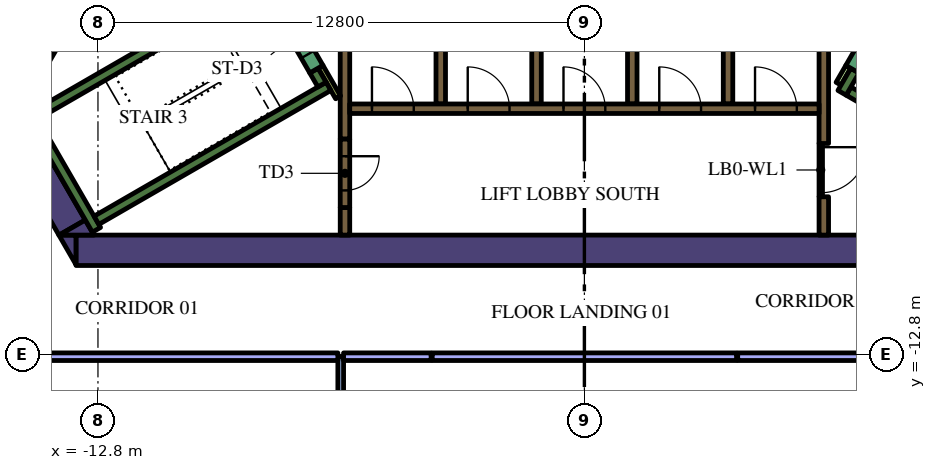
"""IFC4 building model, lengths in metres.
Left out: names, types, materials, properties, quantities, classifications, styles, units other than length and angle.
Written with IfcOpenShell. Run it as: python <this file> out.ifc"""

import sys

from ifc_helpers import new_model, si_unit, direction, frame, frame_2d, origin, place, context, subcontext, project, spatial, polyline, rectangle, outline, extrude, element, fill, save


model = new_model("IFC4")
c1 = context("Model", 3, precision=1e-05, world=origin(), true_north=direction((0.0, 1.0)))
c2 = subcontext(c1, "Body", "Model", "MODEL_VIEW")
j1 = project(units=[si_unit("LENGTHUNIT", "METRE"), si_unit("PLANEANGLEUNIT", "RADIAN")], contexts=[c1])
p1 = place(None, origin())
s1 = spatial("IfcSite", under=j1, at=p1, CompositionType="ELEMENT")
p2 = place(p1, origin())
s2 = spatial("IfcBuilding", under=s1, at=p2, CompositionType="ELEMENT")
p3 = place(p2, frame((0.0, 0.0, 171.0)))
s3 = spatial("IfcBuildingStorey", under=s2, at=p3, CompositionType="ELEMENT", Elevation=171.0)
p4 = place(p3, frame((-13.378, -10.05, 0.0), z_axis=(0.0, 0.0, 1.0), x_axis=(1.0, 0.0, 0.0)))
e1 = element("IfcWall", 1, at=p4, inside=s3, PredefinedType="SOLIDWALL", context=c2, shape_type="SweptSolid", body=[
    extrude(rectangle(XDim=22.282, YDim=0.8, at=frame_2d((11.141, 0.0))), origin(), (0.0, 0.0, 1.0), 4.2),
])
p5 = place(p3, origin())
e2 = element("IfcWall", 2, at=p5, inside=s3, PredefinedType="SOLIDWALL", context=c2, shape_type="SweptSolid", body=[
    extrude(outline(polyline([(-13.828, -9.65), (-13.38, -9.65), (-13.38, -10.426), (-13.828, -9.65)])), origin(), (0.0, 0.0, 1.0), 4.2),
])
p6 = place(p3, frame((-15.392, -6.14, 0.0), z_axis=(0.0, 0.0, 1.0), x_axis=(0.499984020225, -0.866034629516, 0.0)))
e3 = element("IfcWall", 3, at=p6, inside=s3, PredefinedType="SOLIDWALL", context=c2, shape_type="SweptSolid", body=[
    extrude(rectangle(XDim=3.824, YDim=0.8, at=frame_2d((1.912, 0.0))), origin(), (0.0, 0.0, 1.0), 4.2),
])
e4 = element("IfcWall", 4, at=p5, inside=s3, PredefinedType="SOLIDWALL", context=c2, shape_type="SweptSolid", body=[
    extrude(outline(polyline([(-12.904, -9.65), (-13.82, -9.65), (-13.133, -9.253), (-12.904, -9.65)])), origin(), (0.0, 0.0, 1.0), 4.2),
])
p7 = place(p3, frame((-13.518, -3.314, 0.0), z_axis=(0.0, 0.0, 1.0), x_axis=(-0.499969377405, -0.866043083026, 0.0)))
e5 = element("IfcWall", 5, at=p7, inside=s3, PredefinedType="SOLIDWALL", context=c2, shape_type="SweptSolid", body=[
    extrude(rectangle(XDim=2.824, YDim=0.8, at=frame_2d((1.412, 0.0))), origin(), (0.0, 0.0, 1.0), 4.2),
])
p8 = place(p3, frame((12.84, -9.261, 0.0), z_axis=(0.0, 0.0, 1.0), x_axis=(-0.866013990052, 0.500019768644, 0.0)))
e6 = element("IfcWall", 6, at=p8, inside=s3, PredefinedType="SOLIDWALL", context=c2, shape_type="SweptSolid", body=[
    extrude(rectangle(XDim=6.8, YDim=0.25, at=frame_2d((3.4, 0.0))), origin(), (0.0, 0.0, 1.0), 4.2),
])
p9 = place(p3, frame((6.78, -5.906, 0.0), z_axis=(0.0, 0.0, 1.0), x_axis=(0.500223362819, 0.865896406789, 0.0)))
e7 = element("IfcWall", 7, at=p9, inside=s3, PredefinedType="SOLIDWALL", context=c2, shape_type="SweptSolid", body=[
    extrude(rectangle(XDim=0.675, YDim=0.25, at=frame_2d((0.337, 0.0))), origin(), (0.0, 0.0, 1.0), 4.2),
])
p10 = place(p3, frame((-12.84, -9.511, 0.0), z_axis=(0.0, 0.0, 1.0), x_axis=(-0.499997733992, 0.866026712061, 0.0)))
e8 = element("IfcWall", 8, at=p10, inside=s3, PredefinedType="SOLIDWALL", context=c2, shape_type="SweptSolid", body=[
    extrude(rectangle(XDim=3.634, YDim=0.25, at=frame_2d((1.817, 0.0))), origin(), (0.0, 0.0, 1.0), 4.2),
])
p11 = place(p3, frame((-14.44, -6.49, 0.0), z_axis=(0.0, 0.0, 1.0), x_axis=(0.866022966069, 0.500004222222, 0.0)))
e9 = element("IfcWall", 9, at=p11, inside=s3, PredefinedType="SOLIDWALL", context=c2, shape_type="SweptSolid", body=[
    extrude(rectangle(XDim=6.8, YDim=0.25, at=frame_2d((3.4, 0.0))), origin(), (0.0, 0.0, 1.0), 4.2),
])
p12 = place(p3, frame((-12.84, -9.261, 0.0), z_axis=(0.0, 0.0, 1.0), x_axis=(0.866016039709, 0.500016218704, 0.0)))
e10 = element("IfcWall", 10, at=p12, inside=s3, PredefinedType="SOLIDWALL", context=c2, shape_type="SweptSolid", body=[
    extrude(rectangle(XDim=7.05, YDim=0.25, at=frame_2d((3.525, 0.0))), origin(), (0.0, 0.0, 1.0), 4.2),
])
p13 = place(p3, frame((-6.905, -5.69, 0.0), z_axis=(0.0, 0.0, 1.0), x_axis=(-0.500402024738, 0.865793170242, 0.0)))
e11 = element("IfcWall", 11, at=p13, inside=s3, PredefinedType="SOLIDWALL", context=c2, shape_type="SweptSolid", body=[
    extrude(rectangle(XDim=0.425, YDim=0.25, at=frame_2d((0.212, 0.0))), origin(), (0.0, 0.0, 1.0), 4.2),
])
p14 = place(p3, frame((-6.3, -8.925, 0.0), z_axis=(0.0, 0.0, 1.0), x_axis=(0.0, -1.0, 0.0)))
e12 = element("IfcWall", 12, at=p14, inside=s3, PredefinedType="SOLIDWALL", context=c2, shape_type="SweptSolid", body=[
    extrude(rectangle(XDim=0.725, YDim=0.25, at=frame_2d((0.363, 0.0))), origin(), (0.0, 0.0, 1.0), 4.2),
])
p15 = place(p3, frame((6.3, -7.24, 0.0), z_axis=(0.0, 0.0, 1.0), x_axis=(0.0, 1.0, 0.0)))
e13 = element("IfcWall", 13, at=p15, inside=s3, PredefinedType="SOLIDWALL", context=c2, shape_type="SweptSolid", body=[
    extrude(rectangle(XDim=3.24, YDim=0.25, at=frame_2d((1.62, 0.0))), origin(), (0.0, 0.0, 1.0), 4.2),
])
p16 = place(p3, frame((6.3, -9.65, 0.0), z_axis=(0.0, 0.0, 1.0), x_axis=(0.0, 1.0, 0.0)))
e14 = element("IfcWall", 14, at=p16, inside=s3, PredefinedType="SOLIDWALL", context=c2, shape_type="SweptSolid", body=[
    extrude(rectangle(XDim=1.008, YDim=0.25, at=frame_2d((0.504, 0.0))), origin(), (0.0, 0.0, 1.0), 4.2),
])
for number, where, z_axis, x_axis in (
    (15, (3.78, -4.0, 0.0), (0.0, 0.0, 1.0), (0.0, -1.0, 0.0)),
    (16, (1.26, -4.0, 0.0), (0.0, 0.0, 1.0), (0.0, -1.0, 0.0)),
    (17, (-1.26, -4.0, 0.0), (0.0, 0.0, 1.0), (0.0, -1.0, 0.0)),
    (18, (-3.78, -4.0, 0.0), (0.0, 0.0, 1.0), (0.0, -1.0, 0.0)),
):
    element("IfcWall", number, at=place(p3, frame(where, z_axis=z_axis, x_axis=x_axis)), inside=s3, PredefinedType="SOLIDWALL", context=c2, shape_type="SweptSolid", body=[
        extrude(rectangle(XDim=2.2, YDim=0.25, at=frame_2d((1.1, 0.0))), origin(), (0.0, 0.0, 1.0), 4.2),
    ])
p17 = place(p3, frame((-6.3, -7.125, 0.0), z_axis=(0.0, 0.0, 1.0), x_axis=(0.0, 1.0, 0.0)))
e19 = element("IfcWall", 19, at=p17, inside=s3, PredefinedType="SOLIDWALL", context=c2, shape_type="SweptSolid", body=[
    extrude(rectangle(XDim=3.125, YDim=0.25, at=frame_2d((1.562, 0.0))), origin(), (0.0, 0.0, 1.0), 4.2),
])
p18 = place(p3, frame((-6.48, -6.027, 0.0), z_axis=(0.0, 0.0, 1.0), x_axis=(-0.499927229454, 0.866067413802, 0.0)))
e20 = element("IfcWall", 20, at=p18, inside=s3, PredefinedType="PARTITIONING", context=c2, shape_type="SweptSolid", body=[
    extrude(rectangle(XDim=0.929, YDim=0.15, at=frame_2d((0.464, 0.0))), origin(), (0.0, 0.0, 1.0), 4.2),
])
p19 = place(p3, frame((6.945, -5.222, 0.0), z_axis=(0.0, 0.0, 1.0), x_axis=(-0.499818422106, -0.866130212453, 0.0)))
e21 = element("IfcWall", 21, at=p19, inside=s3, PredefinedType="PARTITIONING", context=c2, shape_type="SweptSolid", body=[
    extrude(rectangle(XDim=0.514, YDim=0.15, at=frame_2d((0.257, 0.0))), origin(), (0.0, 0.0, 1.0), 3.15),
])
p20 = place(p3, frame((-6.175, -6.325, 0.0), z_axis=(0.0, 0.0, 1.0), x_axis=(1.0, 0.0, 0.0)))
e22 = element("IfcWall", 22, at=p20, inside=s3, PredefinedType="SOLIDWALL", context=c2, shape_type="SweptSolid", body=[
    extrude(rectangle(XDim=12.35, YDim=0.25, at=frame_2d((6.175, 0.0))), origin(), (0.0, 0.0, 1.0), 4.2),
])
p21 = place(p20, frame((0.585, 0.0, 0.0)))
e23 = element("IfcOpeningElement", 23, at=p21, cuts=e22, PredefinedType="OPENING", context=c2, shape_type="SweptSolid", body=[
    extrude(rectangle(XDim=1.1, YDim=2.1, at=frame_2d((0.55, 1.05))), frame((0.0, 0.135, 0.0), z_axis=(0.0, -1.0, 0.0), x_axis=(1.0, 0.0, 0.0)), (0.0, 0.0, 1.0), 0.27),
])
p22 = place(p20, frame((3.105, 0.0, 0.0)))
e24 = element("IfcOpeningElement", 24, at=p22, cuts=e22, PredefinedType="OPENING", context=c2, shape_type="SweptSolid", body=[
    extrude(rectangle(XDim=1.1, YDim=2.1, at=frame_2d((0.55, 1.05))), frame((0.0, 0.135, 0.0), z_axis=(0.0, -1.0, 0.0), x_axis=(1.0, 0.0, 0.0)), (0.0, 0.0, 1.0), 0.27),
])
p23 = place(p20, frame((5.625, 0.0, 0.0)))
e25 = element("IfcOpeningElement", 25, at=p23, cuts=e22, PredefinedType="OPENING", context=c2, shape_type="SweptSolid", body=[
    extrude(rectangle(XDim=1.1, YDim=2.1, at=frame_2d((0.55, 1.05))), frame((0.0, 0.135, 0.0), z_axis=(0.0, -1.0, 0.0), x_axis=(1.0, 0.0, 0.0)), (0.0, 0.0, 1.0), 0.27),
])
p24 = place(p20, frame((8.145, 0.0, 0.0)))
e26 = element("IfcOpeningElement", 26, at=p24, cuts=e22, PredefinedType="OPENING", context=c2, shape_type="SweptSolid", body=[
    extrude(rectangle(XDim=1.1, YDim=2.1, at=frame_2d((0.55, 1.05))), frame((0.0, 0.135, 0.0), z_axis=(0.0, -1.0, 0.0), x_axis=(1.0, 0.0, 0.0)), (0.0, 0.0, 1.0), 0.27),
])
p25 = place(p20, frame((10.665, 0.0, 0.0)))
e27 = element("IfcOpeningElement", 27, at=p25, cuts=e22, PredefinedType="OPENING", context=c2, shape_type="SweptSolid", body=[
    extrude(rectangle(XDim=1.1, YDim=2.1, at=frame_2d((0.55, 1.05))), frame((0.0, 0.135, 0.0), z_axis=(0.0, -1.0, 0.0), x_axis=(1.0, 0.0, 0.0)), (0.0, 0.0, 1.0), 0.27),
])
p26 = place(p3, frame((7.053, -5.284, 0.0), z_axis=(0.0, 0.0, 1.0), x_axis=(0.500078061341, 0.865980330357, 0.0)))
e28 = element("IfcWall", 28, at=p26, inside=s3, PredefinedType="SOLIDWALL", context=c2, shape_type="SweptSolid", body=[
    extrude(rectangle(XDim=2.1, YDim=0.4, at=frame_2d((1.05, 0.0))), origin(), (0.0, 0.0, 1.0), 4.2),
])
p27 = place(p26, frame((0.45, 0.0, 0.0)))
e29 = element("IfcOpeningElement", 29, at=p27, cuts=e28, PredefinedType="OPENING", context=c2, shape_type="SweptSolid", body=[
    extrude(rectangle(XDim=1.2, YDim=2.1, at=frame_2d((0.6, 1.05))), frame((0.0, 0.21, 0.0), z_axis=(0.0, -1.0, 0.0), x_axis=(1.0, 0.0, 0.0)), (0.0, 0.0, 1.0), 0.42),
])
p28 = place(p3, frame((-8.103, -3.466, 0.0), z_axis=(0.0, 0.0, 1.0), x_axis=(0.500078061341, -0.865980330357, 0.0)))
e30 = element("IfcWall", 30, at=p28, inside=s3, PredefinedType="SOLIDWALL", context=c2, shape_type="SweptSolid", body=[
    extrude(rectangle(XDim=2.1, YDim=0.4, at=frame_2d((1.05, 0.0))), origin(), (0.0, 0.0, 1.0), 4.2),
])
p29 = place(p28, frame((0.45, 0.0, 0.0)))
e31 = element("IfcOpeningElement", 31, at=p29, cuts=e30, PredefinedType="OPENING", context=c2, shape_type="SweptSolid", body=[
    extrude(rectangle(XDim=1.2, YDim=2.1, at=frame_2d((0.6, 1.05))), frame((0.0, 0.21, 0.0), z_axis=(0.0, -1.0, 0.0), x_axis=(1.0, 0.0, 0.0)), (0.0, 0.0, 1.0), 0.42),
])
p30 = place(p3, frame((-6.3, -7.125, 0.0), z_axis=(0.0, 0.0, 1.0), x_axis=(0.0, -1.0, 0.0)))
e32 = element("IfcWall", 32, at=p30, inside=s3, PredefinedType="SOLIDWALL", context=c2, shape_type="SweptSolid", body=[
    extrude(rectangle(XDim=1.8, YDim=0.25, at=frame_2d((0.9, 0.0))), origin(), (0.0, 0.0, 1.0), 4.2),
])
p31 = place(p30, frame((0.45, 0.0, 0.0)))
e33 = element("IfcOpeningElement", 33, at=p31, cuts=e32, PredefinedType="OPENING", context=c2, shape_type="SweptSolid", body=[
    extrude(rectangle(XDim=0.9, YDim=2.1, at=frame_2d((0.45, 1.05))), frame((0.0, 0.135, 0.0), z_axis=(0.0, -1.0, 0.0), x_axis=(1.0, 0.0, 0.0)), (0.0, 0.0, 1.0), 0.27),
])
p32 = place(p3, frame((6.22, -7.237, 0.0), z_axis=(0.0, 0.0, 1.0), x_axis=(0.0, -1.0, 0.0)))
e34 = element("IfcWall", 34, at=p32, inside=s3, PredefinedType="PARTITIONING", context=c2, shape_type="SweptSolid", body=[
    extrude(rectangle(XDim=1.4, YDim=0.09, at=frame_2d((0.7, 0.0))), origin(), (0.0, 0.0, 1.0), 3.15),
])
p33 = place(p32, frame((0.1, 0.0, 0.0)))
e35 = element("IfcOpeningElement", 35, at=p33, cuts=e34, PredefinedType="OPENING", context=c2, shape_type="SweptSolid", body=[
    extrude(rectangle(XDim=1.2, YDim=2.1, at=frame_2d((0.6, 1.05))), frame((0.0, 0.055, 0.0), z_axis=(0.0, -1.0, 0.0), x_axis=(1.0, 0.0, 0.0)), (0.0, 0.0, 1.0), 0.11),
])
p34 = place(p3, frame((-6.412, -16.672, 0.0), z_axis=(0.0, 0.0, 1.0), x_axis=(0.0, 1.0, 0.0)))
e36 = element("IfcWall", 36, at=p34, inside=s3, PredefinedType="PARTITIONING", context=c2, shape_type="SweptSolid", body=[
    extrude(rectangle(XDim=3.822, YDim=0.15, at=frame_2d((1.911, 0.0))), origin(), (0.0, 0.0, 1.0), 3.15),
])
p35 = place(p34, frame((1.422, 0.0, 0.0)))
e37 = element("IfcOpeningElement", 37, at=p35, cuts=e36, PredefinedType="OPENING", context=c2, shape_type="SweptSolid", body=[
    extrude(rectangle(XDim=0.9, YDim=2.1, at=frame_2d((0.45, 1.05))), frame((0.0, 0.085, 0.0), z_axis=(0.0, -1.0, 0.0), x_axis=(1.0, 0.0, 0.0)), (0.0, 0.0, 1.0), 0.17),
])
p36 = place(p3, frame((-14.721, -12.85, 0.0), z_axis=(0.0, 0.0, 1.0), x_axis=(1.0, 0.0, 0.0)))
e38 = element("IfcWall", 38, at=p36, inside=s3, PredefinedType="PARTITIONING", context=c2, shape_type="SweptSolid", body=[
    extrude(rectangle(XDim=8.234, YDim=0.2, at=frame_2d((4.117, 0.0))), origin(), (0.0, 0.0, 1.0), 3.15),
])
p37 = place(p3, frame((-4.004, -12.85, 0.0), z_axis=(0.0, 0.0, 1.0), x_axis=(1.0, 0.0, 0.0)))
e39 = element("IfcWall", 39, at=p37, inside=s3, PredefinedType="PARTITIONING", context=c2, shape_type="SweptSolid", body=[
    extrude(rectangle(XDim=8.008, YDim=0.2, at=frame_2d((4.004, 0.0))), origin(), (0.0, 0.0, 1.0), 3.15),
])
p38 = place(p3, frame((-6.337, -12.85, 0.0), z_axis=(0.0, 0.0, 1.0), x_axis=(1.0, 0.0, 0.0)))
e40 = element("IfcWall", 40, at=p38, inside=s3, PredefinedType="PARTITIONING", context=c2, shape_type="SweptSolid", body=[
    extrude(rectangle(XDim=2.303, YDim=0.2, at=frame_2d((1.151, 0.0))), origin(), (0.0, 0.0, 1.0), 3.15),
])
p39 = place(p3, frame((4.034, -12.85, 0.0), z_axis=(0.0, 0.0, 1.0), x_axis=(1.0, 0.0, 0.0)))
e41 = element("IfcWall", 41, at=p39, inside=s3, PredefinedType="PARTITIONING", context=c2, shape_type="SweptSolid", body=[
    extrude(rectangle(XDim=10.717, YDim=0.2, at=frame_2d((5.359, 0.0))), origin(), (0.0, 0.0, 1.0), 3.15),
])
p40 = place(p39, frame((4.9, 0.0, 0.0)))
e42 = element("IfcOpeningElement", 42, at=p40, cuts=e41, PredefinedType="OPENING", context=c2, shape_type="SweptSolid", body=[
    extrude(rectangle(XDim=1.0, YDim=2.1, at=frame_2d((0.5, 1.05))), frame((0.0, 0.11, 0.0), z_axis=(0.0, -1.0, 0.0), x_axis=(1.0, 0.0, 0.0)), (0.0, 0.0, 1.0), 0.22),
])
p41 = place(p3, frame((-13.146, 2.931, 0.0), z_axis=(0.0, 0.0, 1.0), x_axis=(-0.499997861235, -0.866026638597, 0.0)))
e43 = element("IfcWall", 43, at=p41, inside=s3, PredefinedType="PARTITIONING", context=c2, shape_type="SweptSolid", body=[
    extrude(rectangle(XDim=10.717, YDim=0.2, at=frame_2d((5.359, 0.0))), origin(), (0.0, 0.0, 1.0), 3.15),
])
p42 = place(p41, frame((4.9, 0.0, 0.0)))
e44 = element("IfcOpeningElement", 44, at=p42, cuts=e43, PredefinedType="OPENING", context=c2, shape_type="SweptSolid", body=[
    extrude(rectangle(XDim=1.0, YDim=2.1, at=frame_2d((0.5, 1.05))), frame((0.0, 0.11, 0.0), z_axis=(0.0, -1.0, 0.0), x_axis=(1.0, 0.0, 0.0)), (0.0, 0.0, 1.0), 0.22),
])
p43 = place(p21, origin())
e45 = element("IfcDoor", 45, at=p43, inside=s3, OperationType="DOUBLE_DOOR_SLIDING", PredefinedType="DOOR", context=c2, shape_type="SweptSolid", body=[
    extrude(rectangle(XDim=1.1, YDim=2.1, at=frame_2d((0.55, 1.05))), frame((0.0, 0.025, 0.0), z_axis=(0.0, -1.0, 0.0), x_axis=(1.0, 0.0, 0.0)), (0.0, 0.0, 1.0), 0.05),
])
fill(e23, e45)
p44 = place(p22, origin())
e46 = element("IfcDoor", 46, at=p44, inside=s3, OperationType="DOUBLE_DOOR_SLIDING", PredefinedType="DOOR", context=c2, shape_type="SweptSolid", body=[
    extrude(rectangle(XDim=1.1, YDim=2.1, at=frame_2d((0.55, 1.05))), frame((0.0, 0.025, 0.0), z_axis=(0.0, -1.0, 0.0), x_axis=(1.0, 0.0, 0.0)), (0.0, 0.0, 1.0), 0.05),
])
fill(e24, e46)
p45 = place(p23, origin())
e47 = element("IfcDoor", 47, at=p45, inside=s3, OperationType="DOUBLE_DOOR_SLIDING", PredefinedType="DOOR", context=c2, shape_type="SweptSolid", body=[
    extrude(rectangle(XDim=1.1, YDim=2.1, at=frame_2d((0.55, 1.05))), frame((0.0, 0.025, 0.0), z_axis=(0.0, -1.0, 0.0), x_axis=(1.0, 0.0, 0.0)), (0.0, 0.0, 1.0), 0.05),
])
fill(e25, e47)
p46 = place(p24, origin())
e48 = element("IfcDoor", 48, at=p46, inside=s3, OperationType="DOUBLE_DOOR_SLIDING", PredefinedType="DOOR", context=c2, shape_type="SweptSolid", body=[
    extrude(rectangle(XDim=1.1, YDim=2.1, at=frame_2d((0.55, 1.05))), frame((0.0, 0.025, 0.0), z_axis=(0.0, -1.0, 0.0), x_axis=(1.0, 0.0, 0.0)), (0.0, 0.0, 1.0), 0.05),
])
fill(e26, e48)
p47 = place(p25, origin())
e49 = element("IfcDoor", 49, at=p47, inside=s3, OperationType="DOUBLE_DOOR_SLIDING", PredefinedType="DOOR", context=c2, shape_type="SweptSolid", body=[
    extrude(rectangle(XDim=1.1, YDim=2.1, at=frame_2d((0.55, 1.05))), frame((0.0, 0.025, 0.0), z_axis=(0.0, -1.0, 0.0), x_axis=(1.0, 0.0, 0.0)), (0.0, 0.0, 1.0), 0.05),
])
fill(e27, e49)
p48 = place(p29, origin())
e50 = element("IfcDoor", 50, at=p48, inside=s3, OperationType="SINGLE_SWING_LEFT", PredefinedType="DOOR", context=c2, shape_type="SweptSolid", body=[
    extrude(rectangle(XDim=1.2, YDim=2.1, at=frame_2d((0.6, 1.05))), frame((0.0, 0.025, 0.0), z_axis=(0.0, -1.0, 0.0), x_axis=(1.0, 0.0, 0.0)), (0.0, 0.0, 1.0), 0.05),
])
fill(e31, e50)
p49 = place(p31, origin())
e51 = element("IfcDoor", 51, at=p49, inside=s3, OperationType="SINGLE_SWING_LEFT", PredefinedType="DOOR", context=c2, shape_type="SweptSolid", body=[
    extrude(rectangle(XDim=0.9, YDim=2.1, at=frame_2d((0.45, 1.05))), frame((0.0, 0.025, 0.0), z_axis=(0.0, -1.0, 0.0), x_axis=(1.0, 0.0, 0.0)), (0.0, 0.0, 1.0), 0.05),
])
fill(e33, e51)
p50 = place(p33, origin())
e52 = element("IfcDoor", 52, at=p50, inside=s3, OperationType="SINGLE_SWING_LEFT", PredefinedType="DOOR", context=c2, shape_type="SweptSolid", body=[
    extrude(rectangle(XDim=1.2, YDim=2.1, at=frame_2d((0.6, 1.05))), frame((0.0, 0.025, 0.0), z_axis=(0.0, -1.0, 0.0), x_axis=(1.0, 0.0, 0.0)), (0.0, 0.0, 1.0), 0.05),
])
fill(e35, e52)
save(model, sys.argv[1])
